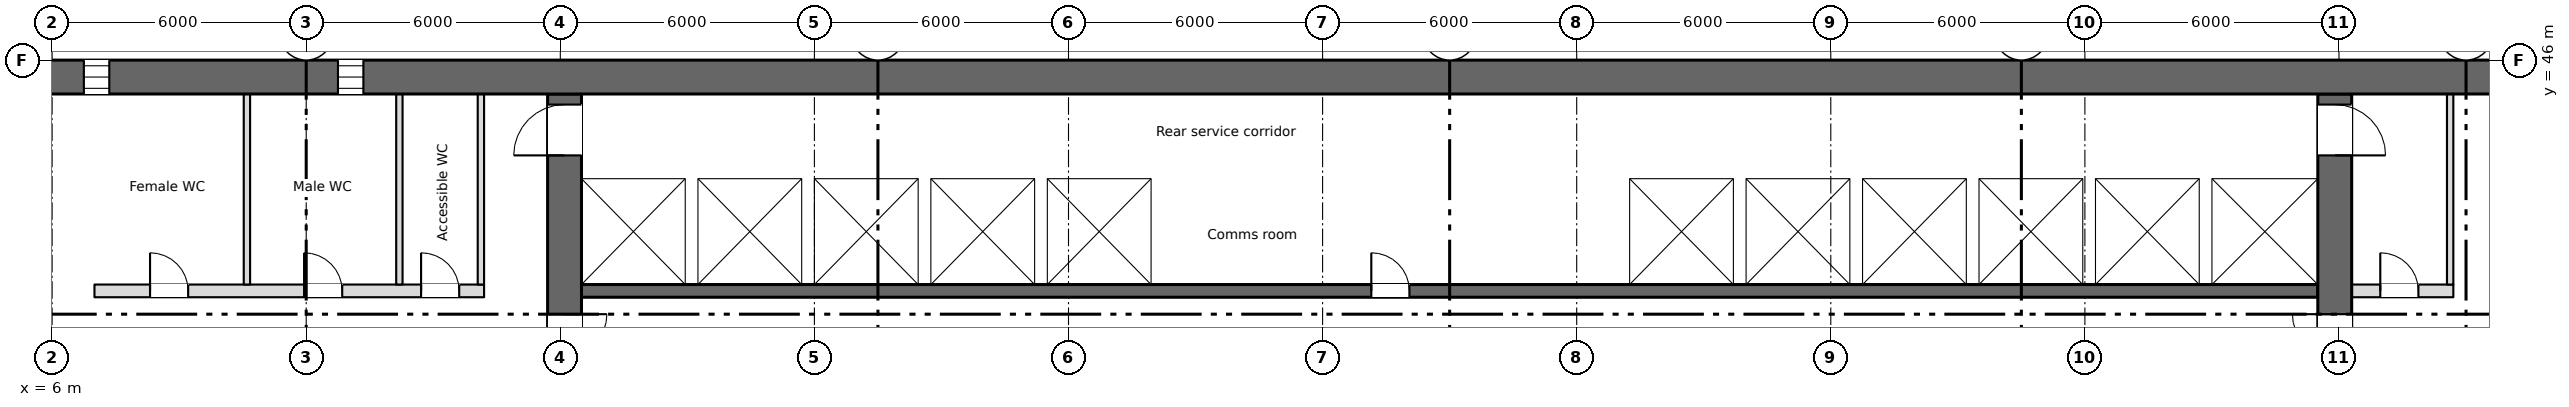
"""IFC4 building model, lengths in metres.
Left out: names, types, materials, properties, quantities, classifications, styles, units other than length and angle.
Written with IfcOpenShell. Run it as: python <this file> out.ifc"""

import sys

from ifc_helpers import new_model, si_unit, direction, frame, frame_2d, origin, place, context, subcontext, project, spatial, rectangle, extrude, element, fill, save


model = new_model("IFC4")
c1 = context("Model", 3, precision=1e-05, world=origin(), true_north=direction((0.0, 1.0)))
c2 = subcontext(c1, "Body", "Model", "MODEL_VIEW")
j1 = project(units=[si_unit("LENGTHUNIT", "METRE"), si_unit("PLANEANGLEUNIT", "RADIAN")], contexts=[c1])
p1 = place(None, origin())
s1 = spatial("IfcSite", under=j1, at=p1, CompositionType="ELEMENT")
p2 = place(p1, origin())
s2 = spatial("IfcBuilding", under=s1, at=p2, CompositionType="ELEMENT")
p3 = place(p2, frame((0.0, 0.0, 151.25)))
s3 = spatial("IfcBuildingStorey", under=s2, at=p3, CompositionType="ELEMENT", Elevation=151.25)
p4 = place(p3, frame((5.55, 45.6, 0.0), z_axis=(0.0, 0.0, 1.0), x_axis=(1.0, 0.0, 0.0)))
e1 = element("IfcWall", 1, at=p4, inside=s3, PredefinedType="SHEAR", context=c2, shape_type="SweptSolid", body=[
    extrude(rectangle(XDim=60.9, YDim=0.8, at=frame_2d((30.45, 0.0))), origin(), (0.0, 0.0, 1.0), 3.35),
])
p5 = place(p4, frame((1.2, 0.0, 0.6)))
e2 = element("IfcOpeningElement", 2, at=p5, cuts=e1, PredefinedType="OPENING", context=c2, shape_type="SweptSolid", body=[
    extrude(rectangle(XDim=0.6, YDim=2.4, at=frame_2d((0.3, 1.2))), frame((0.0, 0.41, 0.0), z_axis=(0.0, -1.0, 0.0), x_axis=(1.0, 0.0, 0.0)), (0.0, 0.0, 1.0), 0.82),
])
p6 = place(p4, frame((7.2, 0.0, 0.6)))
e3 = element("IfcOpeningElement", 3, at=p6, cuts=e1, PredefinedType="OPENING", context=c2, shape_type="SweptSolid", body=[
    extrude(rectangle(XDim=0.6, YDim=2.4, at=frame_2d((0.3, 1.2))), frame((0.0, 0.41, 0.0), z_axis=(0.0, -1.0, 0.0), x_axis=(1.0, 0.0, 0.0)), (0.0, 0.0, 1.0), 0.82),
])
p7 = place(p3, frame((6.85, 28.4, 0.0), z_axis=(0.0, 0.0, 1.0), x_axis=(0.0, 1.0, 0.0)))
e4 = element("IfcWall", 4, at=p7, inside=s3, PredefinedType="SHEAR", context=c2, shape_type="SweptSolid", body=[
    extrude(rectangle(XDim=16.8, YDim=0.3, at=frame_2d((8.4, 0.0))), origin(), (0.0, 0.0, 1.0), 3.35),
])
p8 = place(p3, frame((18.1, 28.4, 0.0), z_axis=(0.0, 0.0, 1.0), x_axis=(0.0, 1.0, 0.0)))
e5 = element("IfcWall", 5, at=p8, inside=s3, PredefinedType="SHEAR", context=c2, shape_type="SweptSolid", body=[
    extrude(rectangle(XDim=16.8, YDim=0.8, at=frame_2d((8.4, 0.0))), origin(), (0.0, 0.0, 1.0), 3.35),
])
p9 = place(p8, frame((9.6, 0.0, 0.0)))
e6 = element("IfcOpeningElement", 6, at=p9, cuts=e5, PredefinedType="OPENING", context=c2, shape_type="SweptSolid", body=[
    extrude(rectangle(XDim=2.0, YDim=2.1, at=frame_2d((1.0, 1.05))), frame((0.0, 0.41, 0.0), z_axis=(0.0, -1.0, 0.0), x_axis=(1.0, 0.0, 0.0)), (0.0, 0.0, 1.0), 0.82),
])
p10 = place(p8, frame((15.35, 0.0, 0.0)))
e7 = element("IfcOpeningElement", 7, at=p10, cuts=e5, PredefinedType="OPENING", context=c2, shape_type="SweptSolid", body=[
    extrude(rectangle(XDim=1.2, YDim=2.1, at=frame_2d((0.6, 1.05))), frame((0.0, 0.41, 0.0), z_axis=(0.0, -1.0, 0.0), x_axis=(1.0, 0.0, 0.0)), (0.0, 0.0, 1.0), 0.82),
])
p11 = place(p3, frame((59.9, 28.4, 0.0), z_axis=(0.0, 0.0, 1.0), x_axis=(0.0, 1.0, 0.0)))
e8 = element("IfcWall", 8, at=p11, inside=s3, PredefinedType="SHEAR", context=c2, shape_type="SweptSolid", body=[
    extrude(rectangle(XDim=16.8, YDim=0.8, at=frame_2d((8.4, 0.0))), origin(), (0.0, 0.0, 1.0), 3.35),
])
p12 = place(p11, frame((9.6, 0.0, 0.0)))
e9 = element("IfcOpeningElement", 9, at=p12, cuts=e8, PredefinedType="OPENING", context=c2, shape_type="SweptSolid", body=[
    extrude(rectangle(XDim=2.0, YDim=2.1, at=frame_2d((1.0, 1.05))), frame((0.0, 0.41, 0.0), z_axis=(0.0, -1.0, 0.0), x_axis=(1.0, 0.0, 0.0)), (0.0, 0.0, 1.0), 0.82),
])
p13 = place(p11, frame((15.35, 0.0, 0.0)))
e10 = element("IfcOpeningElement", 10, at=p13, cuts=e8, PredefinedType="OPENING", context=c2, shape_type="SweptSolid", body=[
    extrude(rectangle(XDim=1.2, YDim=2.1, at=frame_2d((0.6, 1.05))), frame((0.0, 0.41, 0.0), z_axis=(0.0, -1.0, 0.0), x_axis=(1.0, 0.0, 0.0)), (0.0, 0.0, 1.0), 0.82),
])
p14 = place(p3, frame((18.5, 40.55, 0.0), z_axis=(0.0, 0.0, 1.0), x_axis=(1.0, 0.0, 0.0)))
e11 = element("IfcWall", 11, at=p14, inside=s3, PredefinedType="SHEAR", context=c2, shape_type="SweptSolid", body=[
    extrude(rectangle(XDim=41.0, YDim=0.3, at=frame_2d((20.5, 0.0))), origin(), (0.0, 0.0, 1.0), 3.35),
])
p15 = place(p14, frame((18.65, 0.0, 0.0)))
e12 = element("IfcOpeningElement", 12, at=p15, cuts=e11, PredefinedType="OPENING", context=c2, shape_type="SweptSolid", body=[
    extrude(rectangle(XDim=0.9, YDim=2.1, at=frame_2d((0.45, 1.05))), frame((0.0, 0.16, 0.0), z_axis=(0.0, -1.0, 0.0), x_axis=(1.0, 0.0, 0.0)), (0.0, 0.0, 1.0), 0.32),
])
p16 = place(p14, frame((6.175, 0.0, 0.0)))
e13 = element("IfcOpeningElement", 13, at=p16, cuts=e11, PredefinedType="OPENING", context=c2, shape_type="SweptSolid", body=[
    extrude(rectangle(XDim=1.1, YDim=2.1, at=frame_2d((0.55, 1.05))), frame((0.0, 0.16, 0.0), z_axis=(0.0, -1.0, 0.0), x_axis=(1.0, 0.0, 0.0)), (0.0, 0.0, 1.0), 0.32),
])
p17 = place(p14, frame((8.925, 0.0, 0.0)))
e14 = element("IfcOpeningElement", 14, at=p17, cuts=e11, PredefinedType="OPENING", context=c2, shape_type="SweptSolid", body=[
    extrude(rectangle(XDim=1.1, YDim=2.1, at=frame_2d((0.55, 1.05))), frame((0.0, 0.16, 0.0), z_axis=(0.0, -1.0, 0.0), x_axis=(1.0, 0.0, 0.0)), (0.0, 0.0, 1.0), 0.32),
])
p18 = place(p14, frame((11.675, 0.0, 0.0)))
e15 = element("IfcOpeningElement", 15, at=p18, cuts=e11, PredefinedType="OPENING", context=c2, shape_type="SweptSolid", body=[
    extrude(rectangle(XDim=1.1, YDim=2.1, at=frame_2d((0.55, 1.05))), frame((0.0, 0.16, 0.0), z_axis=(0.0, -1.0, 0.0), x_axis=(1.0, 0.0, 0.0)), (0.0, 0.0, 1.0), 0.32),
])
p19 = place(p14, frame((30.925, 0.0, 0.0)))
e16 = element("IfcOpeningElement", 16, at=p19, cuts=e11, PredefinedType="OPENING", context=c2, shape_type="SweptSolid", body=[
    extrude(rectangle(XDim=1.1, YDim=2.1, at=frame_2d((0.55, 1.05))), frame((0.0, 0.16, 0.0), z_axis=(0.0, -1.0, 0.0), x_axis=(1.0, 0.0, 0.0)), (0.0, 0.0, 1.0), 0.32),
])
p20 = place(p14, frame((33.675, 0.0, 0.0)))
e17 = element("IfcOpeningElement", 17, at=p20, cuts=e11, PredefinedType="OPENING", context=c2, shape_type="SweptSolid", body=[
    extrude(rectangle(XDim=1.1, YDim=2.1, at=frame_2d((0.55, 1.05))), frame((0.0, 0.16, 0.0), z_axis=(0.0, -1.0, 0.0), x_axis=(1.0, 0.0, 0.0)), (0.0, 0.0, 1.0), 0.32),
])
p21 = place(p14, frame((36.375, 0.0, 0.0)))
e18 = element("IfcOpeningElement", 18, at=p21, cuts=e11, PredefinedType="OPENING", context=c2, shape_type="SweptSolid", body=[
    extrude(rectangle(XDim=1.2, YDim=2.1, at=frame_2d((0.6, 1.05))), frame((0.0, 0.16, 0.0), z_axis=(0.0, -1.0, 0.0), x_axis=(1.0, 0.0, 0.0)), (0.0, 0.0, 1.0), 0.32),
])
p22 = place(p14, frame((39.15, 0.0, 0.0)))
e19 = element("IfcOpeningElement", 19, at=p22, cuts=e11, PredefinedType="OPENING", context=c2, shape_type="SweptSolid", body=[
    extrude(rectangle(XDim=1.2, YDim=2.1, at=frame_2d((0.6, 1.05))), frame((0.0, 0.16, 0.0), z_axis=(0.0, -1.0, 0.0), x_axis=(1.0, 0.0, 0.0)), (0.0, 0.0, 1.0), 0.32),
])
p23 = place(p3, frame((18.5, 43.35, 0.0), z_axis=(0.0, 0.0, 1.0), x_axis=(1.0, 0.0, 0.0)))
e20 = element("IfcWall", 20, at=p23, inside=s3, PredefinedType="SHEAR", context=c2, shape_type="SweptSolid", body=[
    extrude(rectangle(XDim=41.0, YDim=0.3, at=frame_2d((20.5, 0.0))), origin(), (0.0, 0.0, 1.0), 3.35),
])
p24 = place(p3, frame((7.0, 40.55, 0.0), z_axis=(0.0, 0.0, 1.0), x_axis=(1.0, 0.0, 0.0)))
e21 = element("IfcWall", 21, at=p24, inside=s3, PredefinedType="PARTITIONING", context=c2, shape_type="SweptSolid", body=[
    extrude(rectangle(XDim=9.2, YDim=0.3, at=frame_2d((4.6, 0.0))), origin(), (0.0, 0.0, 1.0), 3.35),
])
p25 = place(p24, frame((1.312, 0.0, 0.0)))
e22 = element("IfcOpeningElement", 22, at=p25, cuts=e21, PredefinedType="OPENING", context=c2, shape_type="SweptSolid", body=[
    extrude(rectangle(XDim=0.9, YDim=2.1, at=frame_2d((0.45, 1.05))), frame((0.0, 0.16, 0.0), z_axis=(0.0, -1.0, 0.0), x_axis=(1.0, 0.0, 0.0)), (0.0, 0.0, 1.0), 0.32),
])
p26 = place(p24, frame((4.95, 0.0, 0.0)))
e23 = element("IfcOpeningElement", 23, at=p26, cuts=e21, PredefinedType="OPENING", context=c2, shape_type="SweptSolid", body=[
    extrude(rectangle(XDim=0.9, YDim=2.1, at=frame_2d((0.45, 1.05))), frame((0.0, 0.16, 0.0), z_axis=(0.0, -1.0, 0.0), x_axis=(1.0, 0.0, 0.0)), (0.0, 0.0, 1.0), 0.32),
])
p27 = place(p24, frame((7.712, 0.0, 0.0)))
e24 = element("IfcOpeningElement", 24, at=p27, cuts=e21, PredefinedType="OPENING", context=c2, shape_type="SweptSolid", body=[
    extrude(rectangle(XDim=0.9, YDim=2.1, at=frame_2d((0.45, 1.05))), frame((0.0, 0.16, 0.0), z_axis=(0.0, -1.0, 0.0), x_axis=(1.0, 0.0, 0.0)), (0.0, 0.0, 1.0), 0.32),
])
p28 = place(p3, frame((60.3, 40.55, 0.0), z_axis=(0.0, 0.0, 1.0), x_axis=(1.0, 0.0, 0.0)))
e25 = element("IfcWall", 25, at=p28, inside=s3, PredefinedType="PARTITIONING", context=c2, shape_type="SweptSolid", body=[
    extrude(rectangle(XDim=2.4, YDim=0.3, at=frame_2d((1.2, 0.0))), origin(), (0.0, 0.0, 1.0), 3.35),
])
p29 = place(p28, frame((0.675, 0.0, 0.0)))
e26 = element("IfcOpeningElement", 26, at=p29, cuts=e25, PredefinedType="OPENING", context=c2, shape_type="SweptSolid", body=[
    extrude(rectangle(XDim=0.9, YDim=2.1, at=frame_2d((0.45, 1.05))), frame((0.0, 0.16, 0.0), z_axis=(0.0, -1.0, 0.0), x_axis=(1.0, 0.0, 0.0)), (0.0, 0.0, 1.0), 0.32),
])
for number, where, z_axis, x_axis in (
    (27, (21.1, 40.7, 0.0), (0.0, 0.0, 1.0), (0.0, 1.0, 0.0)),
    (28, (23.85, 40.7, 0.0), (0.0, 0.0, 1.0), (0.0, 1.0, 0.0)),
    (29, (26.6, 40.7, 0.0), (0.0, 0.0, 1.0), (0.0, 1.0, 0.0)),
    (30, (29.35, 40.7, 0.0), (0.0, 0.0, 1.0), (0.0, 1.0, 0.0)),
    (31, (32.1, 40.7, 0.0), (0.0, 0.0, 1.0), (0.0, 1.0, 0.0)),
    (32, (43.1, 40.7, 0.0), (0.0, 0.0, 1.0), (0.0, 1.0, 0.0)),
    (33, (45.85, 40.7, 0.0), (0.0, 0.0, 1.0), (0.0, 1.0, 0.0)),
    (34, (48.6, 40.7, 0.0), (0.0, 0.0, 1.0), (0.0, 1.0, 0.0)),
    (35, (51.35, 40.7, 0.0), (0.0, 0.0, 1.0), (0.0, 1.0, 0.0)),
    (36, (54.1, 40.7, 0.0), (0.0, 0.0, 1.0), (0.0, 1.0, 0.0)),
    (37, (56.85, 40.7, 0.0), (0.0, 0.0, 1.0), (0.0, 1.0, 0.0)),
):
    element("IfcWall", number, at=place(p3, frame(where, z_axis=z_axis, x_axis=x_axis)), inside=s3, PredefinedType="SHEAR", context=c2, shape_type="SweptSolid", body=[
        extrude(rectangle(XDim=2.5, YDim=0.3, at=frame_2d((1.25, 0.0))), origin(), (0.0, 0.0, 1.0), 3.35),
    ])
for number, where, z_axis, x_axis in (
    (38, (16.125, 40.7, 0.0), (0.0, 0.0, 1.0), (0.0, 1.0, 0.0)),
    (39, (62.625, 40.7, 0.0), (0.0, 0.0, 1.0), (0.0, 1.0, 0.0)),
    (40, (10.6, 40.7, 0.0), (0.0, 0.0, 1.0), (0.0, 1.0, 0.0)),
    (41, (14.2, 40.7, 0.0), (0.0, 0.0, 1.0), (0.0, 1.0, 0.0)),
):
    element("IfcWall", number, at=place(p3, frame(where, z_axis=z_axis, x_axis=x_axis)), inside=s3, PredefinedType="PARTITIONING", context=c2, shape_type="SweptSolid", body=[
        extrude(rectangle(XDim=4.5, YDim=0.15, at=frame_2d((2.25, 0.0))), origin(), (0.0, 0.0, 1.0), 3.35),
    ])
p30 = place(p5, origin())
e42 = element("IfcWindow", 42, at=p30, inside=s3, PartitioningType="SINGLE_PANEL", PredefinedType="WINDOW", context=c2, shape_type="SweptSolid", body=[
    extrude(rectangle(XDim=0.6, YDim=2.4, at=frame_2d((0.3, 1.2))), frame((0.0, 0.03, 0.0), z_axis=(0.0, -1.0, 0.0), x_axis=(1.0, 0.0, 0.0)), (0.0, 0.0, 1.0), 0.06),
])
fill(e2, e42)
p31 = place(p6, origin())
e43 = element("IfcWindow", 43, at=p31, inside=s3, PartitioningType="SINGLE_PANEL", PredefinedType="WINDOW", context=c2, shape_type="SweptSolid", body=[
    extrude(rectangle(XDim=0.6, YDim=2.4, at=frame_2d((0.3, 1.2))), frame((0.0, 0.03, 0.0), z_axis=(0.0, -1.0, 0.0), x_axis=(1.0, 0.0, 0.0)), (0.0, 0.0, 1.0), 0.06),
])
fill(e3, e43)
p32 = place(p25, origin())
e44 = element("IfcDoor", 44, at=p32, inside=s3, OperationType="SINGLE_SWING_LEFT", PredefinedType="DOOR", context=c2, shape_type="SweptSolid", body=[
    extrude(rectangle(XDim=0.9, YDim=2.1, at=frame_2d((0.45, 1.05))), frame((0.0, 0.025, 0.0), z_axis=(0.0, -1.0, 0.0), x_axis=(1.0, 0.0, 0.0)), (0.0, 0.0, 1.0), 0.05),
])
fill(e22, e44)
p33 = place(p26, origin())
e45 = element("IfcDoor", 45, at=p33, inside=s3, OperationType="SINGLE_SWING_LEFT", PredefinedType="DOOR", context=c2, shape_type="SweptSolid", body=[
    extrude(rectangle(XDim=0.9, YDim=2.1, at=frame_2d((0.45, 1.05))), frame((0.0, 0.025, 0.0), z_axis=(0.0, -1.0, 0.0), x_axis=(1.0, 0.0, 0.0)), (0.0, 0.0, 1.0), 0.05),
])
fill(e23, e45)
p34 = place(p27, origin())
e46 = element("IfcDoor", 46, at=p34, inside=s3, OperationType="SINGLE_SWING_LEFT", PredefinedType="DOOR", context=c2, shape_type="SweptSolid", body=[
    extrude(rectangle(XDim=0.9, YDim=2.1, at=frame_2d((0.45, 1.05))), frame((0.0, 0.025, 0.0), z_axis=(0.0, -1.0, 0.0), x_axis=(1.0, 0.0, 0.0)), (0.0, 0.0, 1.0), 0.05),
])
fill(e24, e46)
p35 = place(p29, origin())
e47 = element("IfcDoor", 47, at=p35, inside=s3, OperationType="SINGLE_SWING_LEFT", PredefinedType="DOOR", context=c2, shape_type="SweptSolid", body=[
    extrude(rectangle(XDim=0.9, YDim=2.1, at=frame_2d((0.45, 1.05))), frame((0.0, 0.025, 0.0), z_axis=(0.0, -1.0, 0.0), x_axis=(1.0, 0.0, 0.0)), (0.0, 0.0, 1.0), 0.05),
])
fill(e26, e47)
p36 = place(p15, origin())
e48 = element("IfcDoor", 48, at=p36, inside=s3, OperationType="SINGLE_SWING_LEFT", PredefinedType="DOOR", context=c2, shape_type="SweptSolid", body=[
    extrude(rectangle(XDim=0.9, YDim=2.1, at=frame_2d((0.45, 1.05))), frame((0.0, 0.025, 0.0), z_axis=(0.0, -1.0, 0.0), x_axis=(1.0, 0.0, 0.0)), (0.0, 0.0, 1.0), 0.05),
])
fill(e12, e48)
p37 = place(p16, origin())
e49 = element("IfcDoor", 49, at=p37, inside=s3, OperationType="SLIDING_TO_LEFT", PredefinedType="DOOR", context=c2, shape_type="SweptSolid", body=[
    extrude(rectangle(XDim=1.1, YDim=2.1, at=frame_2d((0.55, 1.05))), frame((0.0, 0.025, 0.0), z_axis=(0.0, -1.0, 0.0), x_axis=(1.0, 0.0, 0.0)), (0.0, 0.0, 1.0), 0.05),
])
fill(e13, e49)
p38 = place(p17, origin())
e50 = element("IfcDoor", 50, at=p38, inside=s3, OperationType="SLIDING_TO_LEFT", PredefinedType="DOOR", context=c2, shape_type="SweptSolid", body=[
    extrude(rectangle(XDim=1.1, YDim=2.1, at=frame_2d((0.55, 1.05))), frame((0.0, 0.025, 0.0), z_axis=(0.0, -1.0, 0.0), x_axis=(1.0, 0.0, 0.0)), (0.0, 0.0, 1.0), 0.05),
])
fill(e14, e50)
p39 = place(p18, origin())
e51 = element("IfcDoor", 51, at=p39, inside=s3, OperationType="SLIDING_TO_LEFT", PredefinedType="DOOR", context=c2, shape_type="SweptSolid", body=[
    extrude(rectangle(XDim=1.1, YDim=2.1, at=frame_2d((0.55, 1.05))), frame((0.0, 0.025, 0.0), z_axis=(0.0, -1.0, 0.0), x_axis=(1.0, 0.0, 0.0)), (0.0, 0.0, 1.0), 0.05),
])
fill(e15, e51)
p40 = place(p19, origin())
e52 = element("IfcDoor", 52, at=p40, inside=s3, OperationType="SLIDING_TO_LEFT", PredefinedType="DOOR", context=c2, shape_type="SweptSolid", body=[
    extrude(rectangle(XDim=1.1, YDim=2.1, at=frame_2d((0.55, 1.05))), frame((0.0, 0.025, 0.0), z_axis=(0.0, -1.0, 0.0), x_axis=(1.0, 0.0, 0.0)), (0.0, 0.0, 1.0), 0.05),
])
fill(e16, e52)
p41 = place(p20, origin())
e53 = element("IfcDoor", 53, at=p41, inside=s3, OperationType="SLIDING_TO_LEFT", PredefinedType="DOOR", context=c2, shape_type="SweptSolid", body=[
    extrude(rectangle(XDim=1.1, YDim=2.1, at=frame_2d((0.55, 1.05))), frame((0.0, 0.025, 0.0), z_axis=(0.0, -1.0, 0.0), x_axis=(1.0, 0.0, 0.0)), (0.0, 0.0, 1.0), 0.05),
])
fill(e17, e53)
p42 = place(p21, origin())
e54 = element("IfcDoor", 54, at=p42, inside=s3, OperationType="SLIDING_TO_LEFT", PredefinedType="DOOR", context=c2, shape_type="SweptSolid", body=[
    extrude(rectangle(XDim=1.2, YDim=2.1, at=frame_2d((0.6, 1.05))), frame((0.0, 0.025, 0.0), z_axis=(0.0, -1.0, 0.0), x_axis=(1.0, 0.0, 0.0)), (0.0, 0.0, 1.0), 0.05),
])
fill(e18, e54)
p43 = place(p22, origin())
e55 = element("IfcDoor", 55, at=p43, inside=s3, OperationType="SLIDING_TO_LEFT", PredefinedType="DOOR", context=c2, shape_type="SweptSolid", body=[
    extrude(rectangle(XDim=1.2, YDim=2.1, at=frame_2d((0.6, 1.05))), frame((0.0, 0.025, 0.0), z_axis=(0.0, -1.0, 0.0), x_axis=(1.0, 0.0, 0.0)), (0.0, 0.0, 1.0), 0.05),
])
fill(e19, e55)
p44 = place(p9, origin())
e56 = element("IfcDoor", 56, at=p44, inside=s3, OperationType="DOUBLE_DOOR_SINGLE_SWING", PredefinedType="DOOR", context=c2, shape_type="SweptSolid", body=[
    extrude(rectangle(XDim=2.0, YDim=2.1, at=frame_2d((1.0, 1.05))), frame((0.0, 0.025, 0.0), z_axis=(0.0, -1.0, 0.0), x_axis=(1.0, 0.0, 0.0)), (0.0, 0.0, 1.0), 0.05),
])
fill(e6, e56)
p45 = place(p12, origin())
e57 = element("IfcDoor", 57, at=p45, inside=s3, OperationType="DOUBLE_DOOR_SINGLE_SWING", PredefinedType="DOOR", context=c2, shape_type="SweptSolid", body=[
    extrude(rectangle(XDim=2.0, YDim=2.1, at=frame_2d((1.0, 1.05))), frame((0.0, 0.025, 0.0), z_axis=(0.0, -1.0, 0.0), x_axis=(1.0, 0.0, 0.0)), (0.0, 0.0, 1.0), 0.05),
])
fill(e9, e57)
p46 = place(p10, origin())
e58 = element("IfcDoor", 58, at=p46, inside=s3, OperationType="SINGLE_SWING_LEFT", PredefinedType="DOOR", context=c2, shape_type="SweptSolid", body=[
    extrude(rectangle(XDim=1.2, YDim=2.1, at=frame_2d((0.6, 1.05))), frame((0.0, 0.025, 0.0), z_axis=(0.0, -1.0, 0.0), x_axis=(1.0, 0.0, 0.0)), (0.0, 0.0, 1.0), 0.05),
])
fill(e7, e58)
p47 = place(p13, origin())
e59 = element("IfcDoor", 59, at=p47, inside=s3, OperationType="SINGLE_SWING_LEFT", PredefinedType="DOOR", context=c2, shape_type="SweptSolid", body=[
    extrude(rectangle(XDim=1.2, YDim=2.1, at=frame_2d((0.6, 1.05))), frame((0.0, 0.025, 0.0), z_axis=(0.0, -1.0, 0.0), x_axis=(1.0, 0.0, 0.0)), (0.0, 0.0, 1.0), 0.05),
])
fill(e10, e59)
save(model, sys.argv[1])
